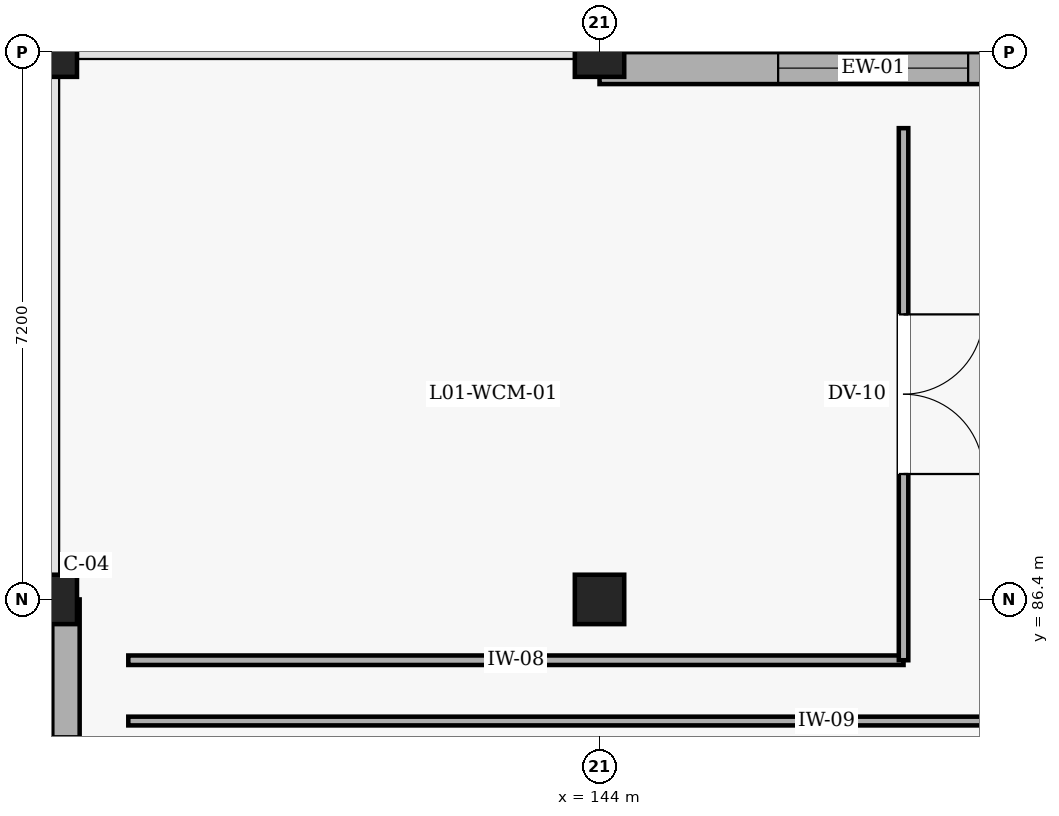
"""IFC4 building model, lengths in metres.
Left out: names, types, materials, properties, quantities, classifications, styles, units other than length and angle.
Written with IfcOpenShell. Run it as: python <this file> out.ifc"""

import sys

from ifc_helpers import new_model, si_unit, direction, frame, frame_2d, origin, origin_2d, place, context, subcontext, project, spatial, rectangle, extrude, element, fill, save


model = new_model("IFC4")
c1 = context("Model", 3, precision=1e-05, world=origin(), true_north=direction((0.0, 1.0)))
c2 = subcontext(c1, "Body", "Model", "MODEL_VIEW")
j1 = project(units=[si_unit("LENGTHUNIT", "METRE"), si_unit("PLANEANGLEUNIT", "RADIAN")], contexts=[c1])
p1 = place(None, origin())
s1 = spatial("IfcSite", under=j1, at=p1, CompositionType="ELEMENT")
p2 = place(p1, origin())
s2 = spatial("IfcBuilding", under=s1, at=p2, CompositionType="ELEMENT")
p3 = place(p2, frame((0.0, 0.0, 5.4)))
s3 = spatial("IfcBuildingStorey", under=s2, at=p3, CompositionType="ELEMENT", Elevation=5.4)
for number, where, z_axis, x_axis in (
    (1, (136.8, 86.4, 0.0), (0.0, 0.0, 1.0), (1.0, 0.0, 0.0)),
    (2, (136.8, 93.6, 0.0), (0.0, 0.0, 1.0), (1.0, 0.0, 0.0)),
    (3, (144.0, 86.4, 0.0), (0.0, 0.0, 1.0), (1.0, 0.0, 0.0)),
    (4, (144.0, 93.6, 0.0), (0.0, 0.0, 1.0), (1.0, 0.0, 0.0)),
):
    element("IfcColumn", number, at=place(p3, frame(where, z_axis=z_axis, x_axis=x_axis)), inside=s3, PredefinedType="COLUMN", context=c2, shape_type="SweptSolid", body=[
        extrude(rectangle(XDim=0.65, YDim=0.65, at=origin_2d()), origin(), (0.0, 0.0, 1.0), 3.9),
    ])
p4 = place(p3, frame((144.0, 93.39, 0.0), z_axis=(0.0, 0.0, 1.0), x_axis=(1.0, 0.0, 0.0)))
e5 = element("IfcWall", 5, at=p4, inside=s3, PredefinedType="SOLIDWALL", context=c2, shape_type="SweptSolid", body=[
    extrude(rectangle(XDim=7.2, YDim=0.42, at=frame_2d((3.6, 0.0))), origin(), (0.0, 0.0, 1.0), 3.6),
])
p5 = place(p4, frame((2.35, 0.0, 0.9)))
e6 = element("IfcOpeningElement", 6, at=p5, cuts=e5, PredefinedType="OPENING", context=c2, shape_type="SweptSolid", body=[
    extrude(rectangle(XDim=2.5, YDim=1.75, at=frame_2d((1.25, 0.875))), frame((0.0, 0.22, 0.0), z_axis=(0.0, -1.0, 0.0), x_axis=(1.0, 0.0, 0.0)), (0.0, 0.0, 1.0), 0.44),
])
p6 = place(p3, frame((136.98, 79.2, 0.0), z_axis=(0.0, 0.0, 1.0), x_axis=(0.0, 1.0, 0.0)))
e7 = element("IfcWall", 7, at=p6, inside=s3, PredefinedType="SOLIDWALL", context=c2, shape_type="SweptSolid", body=[
    extrude(rectangle(XDim=7.2, YDim=0.36, at=frame_2d((3.6, 0.0))), origin(), (0.0, 0.0, 1.0), 3.57),
])
p7 = place(p6, frame((1.8, 0.0, 0.9)))
e8 = element("IfcOpeningElement", 8, at=p7, cuts=e7, PredefinedType="OPENING", context=c2, shape_type="SweptSolid", body=[
    extrude(rectangle(XDim=3.6, YDim=1.8, at=frame_2d((1.8, 0.9))), frame((0.0, 0.19, 0.0), z_axis=(0.0, -1.0, 0.0), x_axis=(1.0, 0.0, 0.0)), (0.0, 0.0, 1.0), 0.38),
])
p8 = place(p3, frame((137.8, 84.8, 0.0), z_axis=(0.0, 0.0, 1.0), x_axis=(1.0, 0.0, 0.0)))
e9 = element("IfcWall", 9, at=p8, inside=s3, PredefinedType="PARTITIONING", context=c2, shape_type="SweptSolid", body=[
    extrude(rectangle(XDim=23.8, YDim=0.115, at=frame_2d((11.9, 0.0))), origin(), (0.0, 0.0, 1.0), 3.5),
])
p9 = place(p3, frame((148.0, 85.6, 0.0), z_axis=(0.0, 0.0, 1.0), x_axis=(-1.0, 0.0, 0.0)))
e10 = element("IfcWall", 10, at=p9, inside=s3, PredefinedType="PARTITIONING", context=c2, shape_type="SweptSolid", body=[
    extrude(rectangle(XDim=10.2, YDim=0.125, at=frame_2d((5.1, 0.0))), origin(), (0.0, 0.0, 1.0), 3.5),
])
p10 = place(p3, frame((148.0, 92.6, 0.0), z_axis=(0.0, 0.0, 1.0), x_axis=(0.0, -1.0, 0.0)))
e11 = element("IfcWall", 11, at=p10, inside=s3, PredefinedType="PARTITIONING", context=c2, shape_type="SweptSolid", body=[
    extrude(rectangle(XDim=7.0, YDim=0.125, at=frame_2d((3.5, 0.0))), origin(), (0.0, 0.0, 1.0), 3.4),
])
p11 = place(p10, frame((2.45, 0.0, 0.0)))
e12 = element("IfcOpeningElement", 12, at=p11, cuts=e11, PredefinedType="OPENING", context=c2, shape_type="SweptSolid", body=[
    extrude(rectangle(XDim=2.1, YDim=2.3, at=frame_2d((1.05, 1.15))), frame((0.0, 0.073, 0.0), z_axis=(0.0, -1.0, 0.0), x_axis=(1.0, 0.0, 0.0)), (0.0, 0.0, 1.0), 0.145),
])
p12 = place(p5, origin())
e13 = element("IfcWindow", 13, at=p12, inside=s3, PartitioningType="SINGLE_PANEL", PredefinedType="WINDOW", context=c2, shape_type="SweptSolid", body=[
    extrude(rectangle(XDim=2.5, YDim=1.75, at=frame_2d((1.25, 0.875))), frame((0.0, 0.03, 0.0), z_axis=(0.0, -1.0, 0.0), x_axis=(1.0, 0.0, 0.0)), (0.0, 0.0, 1.0), 0.06),
])
fill(e6, e13)
p13 = place(p11, origin())
e14 = element("IfcDoor", 14, at=p13, inside=s3, OperationType="DOUBLE_DOOR_SINGLE_SWING", PredefinedType="DOOR", context=c2, shape_type="SweptSolid", body=[
    extrude(rectangle(XDim=2.1, YDim=2.3, at=frame_2d((1.05, 1.15))), frame((0.0, 0.025, 0.0), z_axis=(0.0, -1.0, 0.0), x_axis=(1.0, 0.0, 0.0)), (0.0, 0.0, 1.0), 0.05),
])
fill(e12, e14)
save(model, sys.argv[1])
